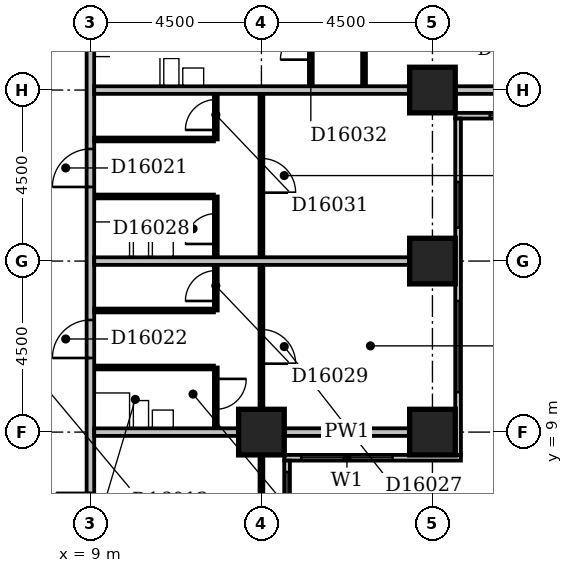
"""IFC4 building model, lengths in metres.
Left out: names, types, materials, properties, quantities, classifications, styles, units other than length and angle.
Written with IfcOpenShell. Run it as: python <this file> out.ifc"""

import sys

from ifc_helpers import new_model, si_unit, direction, frame, frame_2d, origin, origin_2d, place, context, subcontext, project, spatial, rectangle, extrude, element, fill, save


model = new_model("IFC4")
c1 = context("Model", 3, precision=1e-05, world=origin(), true_north=direction((0.0, 1.0)))
c2 = subcontext(c1, "Body", "Model", "MODEL_VIEW")
j1 = project(units=[si_unit("LENGTHUNIT", "METRE"), si_unit("PLANEANGLEUNIT", "RADIAN")], contexts=[c1])
p1 = place(None, origin())
s1 = spatial("IfcSite", under=j1, at=p1, CompositionType="ELEMENT")
p2 = place(p1, origin())
s2 = spatial("IfcBuilding", under=s1, at=p2, CompositionType="ELEMENT")
p3 = place(p2, frame((0.0, 0.0, 68.6)))
s3 = spatial("IfcBuildingStorey", under=s2, at=p3, CompositionType="ELEMENT", Elevation=68.6)
for number, where, z_axis, x_axis in (
    (1, (13.5, 9.0, -0.3), (0.0, 0.0, 1.0), (1.0, 0.0, 0.0)),
    (2, (18.0, 9.0, -0.3), (0.0, 0.0, 1.0), (1.0, 0.0, 0.0)),
    (3, (18.0, 13.5, -0.3), (0.0, 0.0, 1.0), (1.0, 0.0, 0.0)),
    (4, (18.0, 18.0, -0.3), (0.0, 0.0, 1.0), (1.0, 0.0, 0.0)),
):
    element("IfcColumn", number, at=place(p3, frame(where, z_axis=z_axis, x_axis=x_axis)), inside=s3, PredefinedType="COLUMN", context=c2, shape_type="SweptSolid", body=[
        extrude(rectangle(XDim=1.2, YDim=1.2, at=origin_2d()), origin(), (0.0, 0.0, 1.0), 3.6),
    ])
p4 = place(p3, frame((14.175, 3.9, 0.0), z_axis=(0.0, 0.0, 1.0), x_axis=(0.0, 1.0, 0.0)))
e5 = element("IfcWall", 5, at=p4, inside=s3, PredefinedType="STANDARD", context=c2, shape_type="SweptSolid", body=[
    extrude(rectangle(XDim=4.35, YDim=0.15, at=frame_2d((2.175, 0.0))), origin(), (0.0, 0.0, 1.0), 2.7),
])
p5 = place(p4, frame((1.65, 0.0, 0.6)))
e6 = element("IfcOpeningElement", 6, at=p5, cuts=e5, PredefinedType="OPENING", context=c2, shape_type="SweptSolid", body=[
    extrude(rectangle(XDim=2.4, YDim=1.8, at=frame_2d((1.2, 0.9))), frame((0.0, 0.087, 0.0), z_axis=(0.0, -1.0, 0.0), x_axis=(1.0, 0.0, 0.0)), (0.0, 0.0, 1.0), 0.174),
])
p6 = place(p3, frame((14.1, 8.325, 0.0), z_axis=(0.0, 0.0, 1.0), x_axis=(1.0, 0.0, 0.0)))
e7 = element("IfcWall", 7, at=p6, inside=s3, PredefinedType="STANDARD", context=c2, shape_type="SweptSolid", body=[
    extrude(rectangle(XDim=4.65, YDim=0.15, at=frame_2d((2.325, 0.0))), origin(), (0.0, 0.0, 1.0), 2.7),
])
p7 = place(p6, frame((0.45, 0.0, 0.6)))
e8 = element("IfcOpeningElement", 8, at=p7, cuts=e7, PredefinedType="OPENING", context=c2, shape_type="SweptSolid", body=[
    extrude(rectangle(XDim=2.4, YDim=1.8, at=frame_2d((1.2, 0.9))), frame((0.0, 0.087, 0.0), z_axis=(0.0, -1.0, 0.0), x_axis=(1.0, 0.0, 0.0)), (0.0, 0.0, 1.0), 0.174),
])
p8 = place(p3, frame((18.675, 8.4, 0.0), z_axis=(0.0, 0.0, 1.0), x_axis=(0.0, 1.0, 0.0)))
e9 = element("IfcWall", 9, at=p8, inside=s3, PredefinedType="STANDARD", context=c2, shape_type="SweptSolid", body=[
    extrude(rectangle(XDim=8.85, YDim=0.15, at=frame_2d((4.425, 0.0))), origin(), (0.0, 0.0, 1.0), 2.7),
])
p9 = place(p8, frame((1.65, 0.0, 0.6)))
e10 = element("IfcOpeningElement", 10, at=p9, cuts=e9, PredefinedType="OPENING", context=c2, shape_type="SweptSolid", body=[
    extrude(rectangle(XDim=2.4, YDim=1.8, at=frame_2d((1.2, 0.9))), frame((0.0, 0.087, 0.0), z_axis=(0.0, -1.0, 0.0), x_axis=(1.0, 0.0, 0.0)), (0.0, 0.0, 1.0), 0.174),
])
p10 = place(p8, frame((5.982, 0.0, 0.6)))
e11 = element("IfcOpeningElement", 11, at=p10, cuts=e9, PredefinedType="OPENING", context=c2, shape_type="SweptSolid", body=[
    extrude(rectangle(XDim=1.2, YDim=1.8, at=frame_2d((0.6, 0.9))), frame((0.0, 0.087, 0.0), z_axis=(0.0, -1.0, 0.0), x_axis=(1.0, 0.0, 0.0)), (0.0, 0.0, 1.0), 0.174),
])
p11 = place(p3, frame((18.6, 17.325, 0.0), z_axis=(0.0, 0.0, 1.0), x_axis=(1.0, 0.0, 0.0)))
e12 = element("IfcWall", 12, at=p11, inside=s3, PredefinedType="STANDARD", context=c2, shape_type="SweptSolid", body=[
    extrude(rectangle(XDim=4.65, YDim=0.15, at=frame_2d((2.325, 0.0))), origin(), (0.0, 0.0, 1.0), 2.7),
])
p12 = place(p11, frame((0.907, 0.0, 0.6)))
e13 = element("IfcOpeningElement", 13, at=p12, cuts=e12, PredefinedType="OPENING", context=c2, shape_type="SweptSolid", body=[
    extrude(rectangle(XDim=2.1, YDim=1.8, at=frame_2d((1.05, 0.9))), frame((0.0, 0.087, 0.0), z_axis=(0.0, -1.0, 0.0), x_axis=(1.0, 0.0, 0.0)), (0.0, 0.0, 1.0), 0.174),
])
p13 = place(p3, frame((9.0, 5.0, 0.0), z_axis=(0.0, 0.0, 1.0), x_axis=(0.0, 1.0, 0.0)))
e14 = element("IfcWall", 14, at=p13, inside=s3, PredefinedType="PARTITIONING", context=c2, shape_type="SweptSolid", body=[
    extrude(rectangle(XDim=44.5, YDim=0.2, at=frame_2d((22.25, 0.0))), origin(), (0.0, 0.0, 1.0), 3.3),
])
p14 = place(p13, frame((22.3, 0.0, 0.0)))
e15 = element("IfcOpeningElement", 15, at=p14, cuts=e14, PredefinedType="OPENING", context=c2, shape_type="SweptSolid", body=[
    extrude(rectangle(XDim=1.0, YDim=2.1, at=frame_2d((0.5, 1.05))), frame((0.0, 0.112, 0.0), z_axis=(0.0, -1.0, 0.0), x_axis=(1.0, 0.0, 0.0)), (0.0, 0.0, 1.0), 0.224),
])
p15 = place(p13, frame((15.7, 0.0, 0.0)))
e16 = element("IfcOpeningElement", 16, at=p15, cuts=e14, PredefinedType="OPENING", context=c2, shape_type="SweptSolid", body=[
    extrude(rectangle(XDim=1.0, YDim=2.1, at=frame_2d((0.5, 1.05))), frame((0.0, 0.112, 0.0), z_axis=(0.0, -1.0, 0.0), x_axis=(1.0, 0.0, 0.0)), (0.0, 0.0, 1.0), 0.224),
])
p16 = place(p13, frame((10.45, 0.0, 0.0)))
e17 = element("IfcOpeningElement", 17, at=p16, cuts=e14, PredefinedType="OPENING", context=c2, shape_type="SweptSolid", body=[
    extrude(rectangle(XDim=1.0, YDim=2.1, at=frame_2d((0.5, 1.05))), frame((0.0, 0.112, 0.0), z_axis=(0.0, -1.0, 0.0), x_axis=(1.0, 0.0, 0.0)), (0.0, 0.0, 1.0), 0.224),
])
p17 = place(p13, frame((5.95, 0.0, 0.0)))
e18 = element("IfcOpeningElement", 18, at=p17, cuts=e14, PredefinedType="OPENING", context=c2, shape_type="SweptSolid", body=[
    extrude(rectangle(XDim=1.0, YDim=2.1, at=frame_2d((0.5, 1.05))), frame((0.0, 0.112, 0.0), z_axis=(0.0, -1.0, 0.0), x_axis=(1.0, 0.0, 0.0)), (0.0, 0.0, 1.0), 0.224),
])
p18 = place(p13, frame((37.25, 0.0, 0.0)))
e19 = element("IfcOpeningElement", 19, at=p18, cuts=e14, PredefinedType="OPENING", context=c2, shape_type="SweptSolid", body=[
    extrude(rectangle(XDim=0.9, YDim=2.1, at=frame_2d((0.45, 1.05))), frame((0.0, 0.112, 0.0), z_axis=(0.0, -1.0, 0.0), x_axis=(1.0, 0.0, 0.0)), (0.0, 0.0, 1.0), 0.224),
])
p19 = place(p13, frame((1.5, 0.0, 0.0)))
e20 = element("IfcOpeningElement", 20, at=p19, cuts=e14, PredefinedType="OPENING", context=c2, shape_type="SweptSolid", body=[
    extrude(rectangle(XDim=0.9, YDim=2.1, at=frame_2d((0.45, 1.05))), frame((0.0, 0.112, 0.0), z_axis=(0.0, -1.0, 0.0), x_axis=(1.0, 0.0, 0.0)), (0.0, 0.0, 1.0), 0.224),
])
p20 = place(p3, frame((13.5, 5.1, 0.0), z_axis=(0.0, 0.0, 1.0), x_axis=(0.0, 1.0, 0.0)))
e21 = element("IfcWall", 21, at=p20, inside=s3, PredefinedType="PARTITIONING", context=c2, shape_type="SweptSolid", body=[
    extrude(rectangle(XDim=3.3, YDim=0.1, at=frame_2d((1.65, 0.0))), origin(), (0.0, 0.0, 1.0), 2.7),
])
p21 = place(p3, frame((9.1, 9.0, 0.0), z_axis=(0.0, 0.0, 1.0), x_axis=(1.0, 0.0, 0.0)))
e22 = element("IfcWall", 22, at=p21, inside=s3, PredefinedType="PARTITIONING", context=c2, shape_type="SweptSolid", body=[
    extrude(rectangle(XDim=3.8, YDim=0.2, at=frame_2d((1.9, 0.0))), origin(), (0.0, 0.0, 1.0), 3.3),
])
p22 = place(p3, frame((14.1, 9.0, 0.0), z_axis=(0.0, 0.0, 1.0), x_axis=(1.0, 0.0, 0.0)))
e23 = element("IfcWall", 23, at=p22, inside=s3, PredefinedType="PARTITIONING", context=c2, shape_type="SweptSolid", body=[
    extrude(rectangle(XDim=3.3, YDim=0.2, at=frame_2d((1.65, 0.0))), origin(), (0.0, 0.0, 1.0), 2.7),
])
p23 = place(p3, frame((12.3, 9.1, 0.0), z_axis=(0.0, 0.0, 1.0), x_axis=(0.0, 1.0, 0.0)))
e24 = element("IfcWall", 24, at=p23, inside=s3, PredefinedType="PARTITIONING", context=c2, shape_type="SweptSolid", body=[
    extrude(rectangle(XDim=1.6, YDim=0.1, at=frame_2d((0.8, 0.0))), origin(), (0.0, 0.0, 1.0), 3.3),
])
p24 = place(p23, frame((0.5, 0.0, 0.0)))
e25 = element("IfcOpeningElement", 25, at=p24, cuts=e24, PredefinedType="OPENING", context=c2, shape_type="SweptSolid", body=[
    extrude(rectangle(XDim=0.8, YDim=2.1, at=frame_2d((0.4, 1.05))), frame((0.0, 0.062, 0.0), z_axis=(0.0, -1.0, 0.0), x_axis=(1.0, 0.0, 0.0)), (0.0, 0.0, 1.0), 0.124),
])
p25 = place(p3, frame((13.5, 9.6, 0.0), z_axis=(0.0, 0.0, 1.0), x_axis=(0.0, 1.0, 0.0)))
e26 = element("IfcWall", 26, at=p25, inside=s3, PredefinedType="PARTITIONING", context=c2, shape_type="SweptSolid", body=[
    extrude(rectangle(XDim=8.3, YDim=0.1, at=frame_2d((4.15, 0.0))), origin(), (0.0, 0.0, 1.0), 3.3),
])
p26 = place(p25, frame((5.7, 0.0, 0.0)))
e27 = element("IfcOpeningElement", 27, at=p26, cuts=e26, PredefinedType="OPENING", context=c2, shape_type="SweptSolid", body=[
    extrude(rectangle(XDim=0.9, YDim=2.1, at=frame_2d((0.45, 1.05))), frame((0.0, 0.062, 0.0), z_axis=(0.0, -1.0, 0.0), x_axis=(1.0, 0.0, 0.0)), (0.0, 0.0, 1.0), 0.124),
])
p27 = place(p25, frame((1.2, 0.0, 0.0)))
e28 = element("IfcOpeningElement", 28, at=p27, cuts=e26, PredefinedType="OPENING", context=c2, shape_type="SweptSolid", body=[
    extrude(rectangle(XDim=0.9, YDim=2.1, at=frame_2d((0.45, 1.05))), frame((0.0, 0.062, 0.0), z_axis=(0.0, -1.0, 0.0), x_axis=(1.0, 0.0, 0.0)), (0.0, 0.0, 1.0), 0.124),
])
p28 = place(p3, frame((9.1, 10.7, 0.0), z_axis=(0.0, 0.0, 1.0), x_axis=(1.0, 0.0, 0.0)))
e29 = element("IfcWall", 29, at=p28, inside=s3, PredefinedType="PLUMBINGWALL", context=c2, shape_type="SweptSolid", body=[
    extrude(rectangle(XDim=3.15, YDim=0.1, at=frame_2d((1.575, 0.0))), origin(), (0.0, 0.0, 1.0), 3.3),
])
p29 = place(p3, frame((9.1, 12.2, 0.0), z_axis=(0.0, 0.0, 1.0), x_axis=(1.0, 0.0, 0.0)))
e30 = element("IfcWall", 30, at=p29, inside=s3, PredefinedType="PARTITIONING", context=c2, shape_type="SweptSolid", body=[
    extrude(rectangle(XDim=3.15, YDim=0.1, at=frame_2d((1.575, 0.0))), origin(), (0.0, 0.0, 1.0), 3.3),
])
p30 = place(p3, frame((12.3, 12.2, 0.0), z_axis=(0.0, 0.0, 1.0), x_axis=(0.0, 1.0, 0.0)))
e31 = element("IfcWall", 31, at=p30, inside=s3, PredefinedType="PARTITIONING", context=c2, shape_type="SweptSolid", body=[
    extrude(rectangle(XDim=3.0, YDim=0.1, at=frame_2d((1.5, 0.0))), origin(), (0.0, 0.0, 1.0), 3.3),
])
p31 = place(p30, frame((1.75, 0.0, 0.0)))
e32 = element("IfcOpeningElement", 32, at=p31, cuts=e31, PredefinedType="OPENING", context=c2, shape_type="SweptSolid", body=[
    extrude(rectangle(XDim=0.8, YDim=2.1, at=frame_2d((0.4, 1.05))), frame((0.0, 0.062, 0.0), z_axis=(0.0, -1.0, 0.0), x_axis=(1.0, 0.0, 0.0)), (0.0, 0.0, 1.0), 0.124),
])
p32 = place(p30, frame((0.25, 0.0, 0.0)))
e33 = element("IfcOpeningElement", 33, at=p32, cuts=e31, PredefinedType="OPENING", context=c2, shape_type="SweptSolid", body=[
    extrude(rectangle(XDim=0.8, YDim=2.1, at=frame_2d((0.4, 1.05))), frame((0.0, 0.062, 0.0), z_axis=(0.0, -1.0, 0.0), x_axis=(1.0, 0.0, 0.0)), (0.0, 0.0, 1.0), 0.124),
])
p33 = place(p3, frame((9.1, 13.5, 0.0), z_axis=(0.0, 0.0, 1.0), x_axis=(1.0, 0.0, 0.0)))
e34 = element("IfcWall", 34, at=p33, inside=s3, PredefinedType="PARTITIONING", context=c2, shape_type="SweptSolid", body=[
    extrude(rectangle(XDim=8.3, YDim=0.2, at=frame_2d((4.15, 0.0))), origin(), (0.0, 0.0, 1.0), 3.3),
])
p34 = place(p3, frame((9.1, 15.2, 0.0), z_axis=(0.0, 0.0, 1.0), x_axis=(1.0, 0.0, 0.0)))
e35 = element("IfcWall", 35, at=p34, inside=s3, PredefinedType="PLUMBINGWALL", context=c2, shape_type="SweptSolid", body=[
    extrude(rectangle(XDim=3.15, YDim=0.1, at=frame_2d((1.575, 0.0))), origin(), (0.0, 0.0, 1.0), 3.3),
])
p35 = place(p3, frame((9.1, 16.7, 0.0), z_axis=(0.0, 0.0, 1.0), x_axis=(1.0, 0.0, 0.0)))
e36 = element("IfcWall", 36, at=p35, inside=s3, PredefinedType="PARTITIONING", context=c2, shape_type="SweptSolid", body=[
    extrude(rectangle(XDim=3.15, YDim=0.1, at=frame_2d((1.575, 0.0))), origin(), (0.0, 0.0, 1.0), 3.3),
])
p36 = place(p3, frame((12.3, 16.7, 0.0), z_axis=(0.0, 0.0, 1.0), x_axis=(0.0, 1.0, 0.0)))
e37 = element("IfcWall", 37, at=p36, inside=s3, PredefinedType="PARTITIONING", context=c2, shape_type="SweptSolid", body=[
    extrude(rectangle(XDim=1.2, YDim=0.1, at=frame_2d((0.6, 0.0))), origin(), (0.0, 0.0, 1.0), 3.3),
])
p37 = place(p36, frame((0.25, 0.0, 0.0)))
e38 = element("IfcOpeningElement", 38, at=p37, cuts=e37, PredefinedType="OPENING", context=c2, shape_type="SweptSolid", body=[
    extrude(rectangle(XDim=0.8, YDim=2.1, at=frame_2d((0.4, 1.05))), frame((0.0, 0.062, 0.0), z_axis=(0.0, -1.0, 0.0), x_axis=(1.0, 0.0, 0.0)), (0.0, 0.0, 1.0), 0.124),
])
p38 = place(p3, frame((9.1, 18.0, 0.0), z_axis=(0.0, 0.0, 1.0), x_axis=(1.0, 0.0, 0.0)))
e39 = element("IfcWall", 39, at=p38, inside=s3, PredefinedType="PARTITIONING", context=c2, shape_type="SweptSolid", body=[
    extrude(rectangle(XDim=8.3, YDim=0.2, at=frame_2d((4.15, 0.0))), origin(), (0.0, 0.0, 1.0), 2.6),
])
p39 = place(p3, frame((18.6, 18.0, 0.0), z_axis=(0.0, 0.0, 1.0), x_axis=(1.0, 0.0, 0.0)))
e40 = element("IfcWall", 40, at=p39, inside=s3, PredefinedType="PARTITIONING", context=c2, shape_type="SweptSolid", body=[
    extrude(rectangle(XDim=3.3, YDim=0.2, at=frame_2d((1.65, 0.0))), origin(), (0.0, 0.0, 1.0), 2.7),
])
p40 = place(p3, frame((14.8, 18.1, 0.0), z_axis=(0.0, 0.0, 1.0), x_axis=(0.0, 1.0, 0.0)))
e41 = element("IfcWall", 41, at=p40, inside=s3, PredefinedType="PARTITIONING", context=c2, shape_type="SweptSolid", body=[
    extrude(rectangle(XDim=2.3, YDim=0.1, at=frame_2d((1.15, 0.0))), origin(), (0.0, 0.0, 1.0), 3.3),
])
p41 = place(p40, frame((0.7, 0.0, 0.0)))
e42 = element("IfcOpeningElement", 42, at=p41, cuts=e41, PredefinedType="OPENING", context=c2, shape_type="SweptSolid", body=[
    extrude(rectangle(XDim=0.8, YDim=2.1, at=frame_2d((0.4, 1.05))), frame((0.0, 0.062, 0.0), z_axis=(0.0, -1.0, 0.0), x_axis=(1.0, 0.0, 0.0)), (0.0, 0.0, 1.0), 0.124),
])
p42 = place(p3, frame((16.2, 18.1, 0.0), z_axis=(0.0, 0.0, 1.0), x_axis=(0.0, 1.0, 0.0)))
e43 = element("IfcWall", 43, at=p42, inside=s3, PredefinedType="PARTITIONING", context=c2, shape_type="SweptSolid", body=[
    extrude(rectangle(XDim=8.8, YDim=0.1, at=frame_2d((4.4, 0.0))), origin(), (0.0, 0.0, 1.0), 3.3),
])
p43 = place(p42, frame((1.7, 0.0, 0.0)))
e44 = element("IfcOpeningElement", 44, at=p43, cuts=e43, PredefinedType="OPENING", context=c2, shape_type="SweptSolid", body=[
    extrude(rectangle(XDim=0.9, YDim=2.1, at=frame_2d((0.45, 1.05))), frame((0.0, 0.062, 0.0), z_axis=(0.0, -1.0, 0.0), x_axis=(1.0, 0.0, 0.0)), (0.0, 0.0, 1.0), 0.124),
])
p44 = place(p42, frame((6.2, 0.0, 0.0)))
e45 = element("IfcOpeningElement", 45, at=p44, cuts=e43, PredefinedType="OPENING", context=c2, shape_type="SweptSolid", body=[
    extrude(rectangle(XDim=0.9, YDim=2.1, at=frame_2d((0.45, 1.05))), frame((0.0, 0.062, 0.0), z_axis=(0.0, -1.0, 0.0), x_axis=(1.0, 0.0, 0.0)), (0.0, 0.0, 1.0), 0.124),
])
p45 = place(p5, origin())
e46 = element("IfcWindow", 46, at=p45, inside=s3, PartitioningType="SINGLE_PANEL", PredefinedType="WINDOW", context=c2, shape_type="SweptSolid", body=[
    extrude(rectangle(XDim=2.4, YDim=1.8, at=frame_2d((1.2, 0.9))), frame((0.0, 0.03, 0.0), z_axis=(0.0, -1.0, 0.0), x_axis=(1.0, 0.0, 0.0)), (0.0, 0.0, 1.0), 0.06),
])
fill(e6, e46)
p46 = place(p7, origin())
e47 = element("IfcWindow", 47, at=p46, inside=s3, PartitioningType="SINGLE_PANEL", PredefinedType="WINDOW", context=c2, shape_type="SweptSolid", body=[
    extrude(rectangle(XDim=2.4, YDim=1.8, at=frame_2d((1.2, 0.9))), frame((0.0, 0.03, 0.0), z_axis=(0.0, -1.0, 0.0), x_axis=(1.0, 0.0, 0.0)), (0.0, 0.0, 1.0), 0.06),
])
fill(e8, e47)
p47 = place(p9, origin())
e48 = element("IfcWindow", 48, at=p47, inside=s3, PartitioningType="SINGLE_PANEL", PredefinedType="WINDOW", context=c2, shape_type="SweptSolid", body=[
    extrude(rectangle(XDim=2.4, YDim=1.8, at=frame_2d((1.2, 0.9))), frame((0.0, 0.03, 0.0), z_axis=(0.0, -1.0, 0.0), x_axis=(1.0, 0.0, 0.0)), (0.0, 0.0, 1.0), 0.06),
])
fill(e10, e48)
p48 = place(p10, origin())
e49 = element("IfcWindow", 49, at=p48, inside=s3, PartitioningType="SINGLE_PANEL", PredefinedType="WINDOW", context=c2, shape_type="SweptSolid", body=[
    extrude(rectangle(XDim=1.2, YDim=1.8, at=frame_2d((0.6, 0.9))), frame((0.0, 0.03, 0.0), z_axis=(0.0, -1.0, 0.0), x_axis=(1.0, 0.0, 0.0)), (0.0, 0.0, 1.0), 0.06),
])
fill(e11, e49)
p49 = place(p12, origin())
e50 = element("IfcWindow", 50, at=p49, inside=s3, PartitioningType="SINGLE_PANEL", PredefinedType="WINDOW", context=c2, shape_type="SweptSolid", body=[
    extrude(rectangle(XDim=2.1, YDim=1.8, at=frame_2d((1.05, 0.9))), frame((0.0, 0.03, 0.0), z_axis=(0.0, -1.0, 0.0), x_axis=(1.0, 0.0, 0.0)), (0.0, 0.0, 1.0), 0.06),
])
fill(e13, e50)
p50 = place(p16, origin())
e51 = element("IfcDoor", 51, at=p50, inside=s3, OperationType="SINGLE_SWING_LEFT", PredefinedType="DOOR", context=c2, shape_type="SweptSolid", body=[
    extrude(rectangle(XDim=1.0, YDim=2.1, at=frame_2d((0.5, 1.05))), frame((0.0, 0.025, 0.0), z_axis=(0.0, -1.0, 0.0), x_axis=(1.0, 0.0, 0.0)), (0.0, 0.0, 1.0), 0.05),
])
fill(e17, e51)
p51 = place(p17, origin())
e52 = element("IfcDoor", 52, at=p51, inside=s3, OperationType="SINGLE_SWING_LEFT", PredefinedType="DOOR", context=c2, shape_type="SweptSolid", body=[
    extrude(rectangle(XDim=1.0, YDim=2.1, at=frame_2d((0.5, 1.05))), frame((0.0, 0.025, 0.0), z_axis=(0.0, -1.0, 0.0), x_axis=(1.0, 0.0, 0.0)), (0.0, 0.0, 1.0), 0.05),
])
fill(e18, e52)
p52 = place(p24, origin())
e53 = element("IfcDoor", 53, at=p52, inside=s3, OperationType="SINGLE_SWING_RIGHT", PredefinedType="DOOR", context=c2, shape_type="SweptSolid", body=[
    extrude(rectangle(XDim=0.8, YDim=2.1, at=frame_2d((0.4, 1.05))), frame((0.0, 0.025, 0.0), z_axis=(0.0, -1.0, 0.0), x_axis=(1.0, 0.0, 0.0)), (0.0, 0.0, 1.0), 0.05),
])
fill(e25, e53)
p53 = place(p26, frame((0.9, 0.0, 0.0), z_axis=(0.0, 0.0, 1.0), x_axis=(-1.0, 0.0, 0.0)))
e54 = element("IfcDoor", 54, at=p53, inside=s3, OperationType="SINGLE_SWING_RIGHT", PredefinedType="DOOR", context=c2, shape_type="SweptSolid", body=[
    extrude(rectangle(XDim=0.9, YDim=2.1, at=frame_2d((0.45, 1.05))), frame((0.0, 0.025, 0.0), z_axis=(0.0, -1.0, 0.0), x_axis=(1.0, 0.0, 0.0)), (0.0, 0.0, 1.0), 0.05),
])
fill(e27, e54)
p54 = place(p27, frame((0.9, 0.0, 0.0), z_axis=(0.0, 0.0, 1.0), x_axis=(-1.0, 0.0, 0.0)))
e55 = element("IfcDoor", 55, at=p54, inside=s3, OperationType="SINGLE_SWING_RIGHT", PredefinedType="DOOR", context=c2, shape_type="SweptSolid", body=[
    extrude(rectangle(XDim=0.9, YDim=2.1, at=frame_2d((0.45, 1.05))), frame((0.0, 0.025, 0.0), z_axis=(0.0, -1.0, 0.0), x_axis=(1.0, 0.0, 0.0)), (0.0, 0.0, 1.0), 0.05),
])
fill(e28, e55)
p55 = place(p31, origin())
e56 = element("IfcDoor", 56, at=p55, inside=s3, OperationType="SINGLE_SWING_LEFT", PredefinedType="DOOR", context=c2, shape_type="SweptSolid", body=[
    extrude(rectangle(XDim=0.8, YDim=2.1, at=frame_2d((0.4, 1.05))), frame((0.0, 0.025, 0.0), z_axis=(0.0, -1.0, 0.0), x_axis=(1.0, 0.0, 0.0)), (0.0, 0.0, 1.0), 0.05),
])
fill(e32, e56)
p56 = place(p32, origin())
e57 = element("IfcDoor", 57, at=p56, inside=s3, OperationType="SINGLE_SWING_LEFT", PredefinedType="DOOR", context=c2, shape_type="SweptSolid", body=[
    extrude(rectangle(XDim=0.8, YDim=2.1, at=frame_2d((0.4, 1.05))), frame((0.0, 0.025, 0.0), z_axis=(0.0, -1.0, 0.0), x_axis=(1.0, 0.0, 0.0)), (0.0, 0.0, 1.0), 0.05),
])
fill(e33, e57)
p57 = place(p37, origin())
e58 = element("IfcDoor", 58, at=p57, inside=s3, OperationType="SINGLE_SWING_LEFT", PredefinedType="DOOR", context=c2, shape_type="SweptSolid", body=[
    extrude(rectangle(XDim=0.8, YDim=2.1, at=frame_2d((0.4, 1.05))), frame((0.0, 0.025, 0.0), z_axis=(0.0, -1.0, 0.0), x_axis=(1.0, 0.0, 0.0)), (0.0, 0.0, 1.0), 0.05),
])
fill(e38, e58)
p58 = place(p41, origin())
e59 = element("IfcDoor", 59, at=p58, inside=s3, OperationType="SINGLE_SWING_LEFT", PredefinedType="DOOR", context=c2, shape_type="SweptSolid", body=[
    extrude(rectangle(XDim=0.8, YDim=2.1, at=frame_2d((0.4, 1.05))), frame((0.0, 0.025, 0.0), z_axis=(0.0, -1.0, 0.0), x_axis=(1.0, 0.0, 0.0)), (0.0, 0.0, 1.0), 0.05),
])
fill(e42, e59)
save(model, sys.argv[1])
